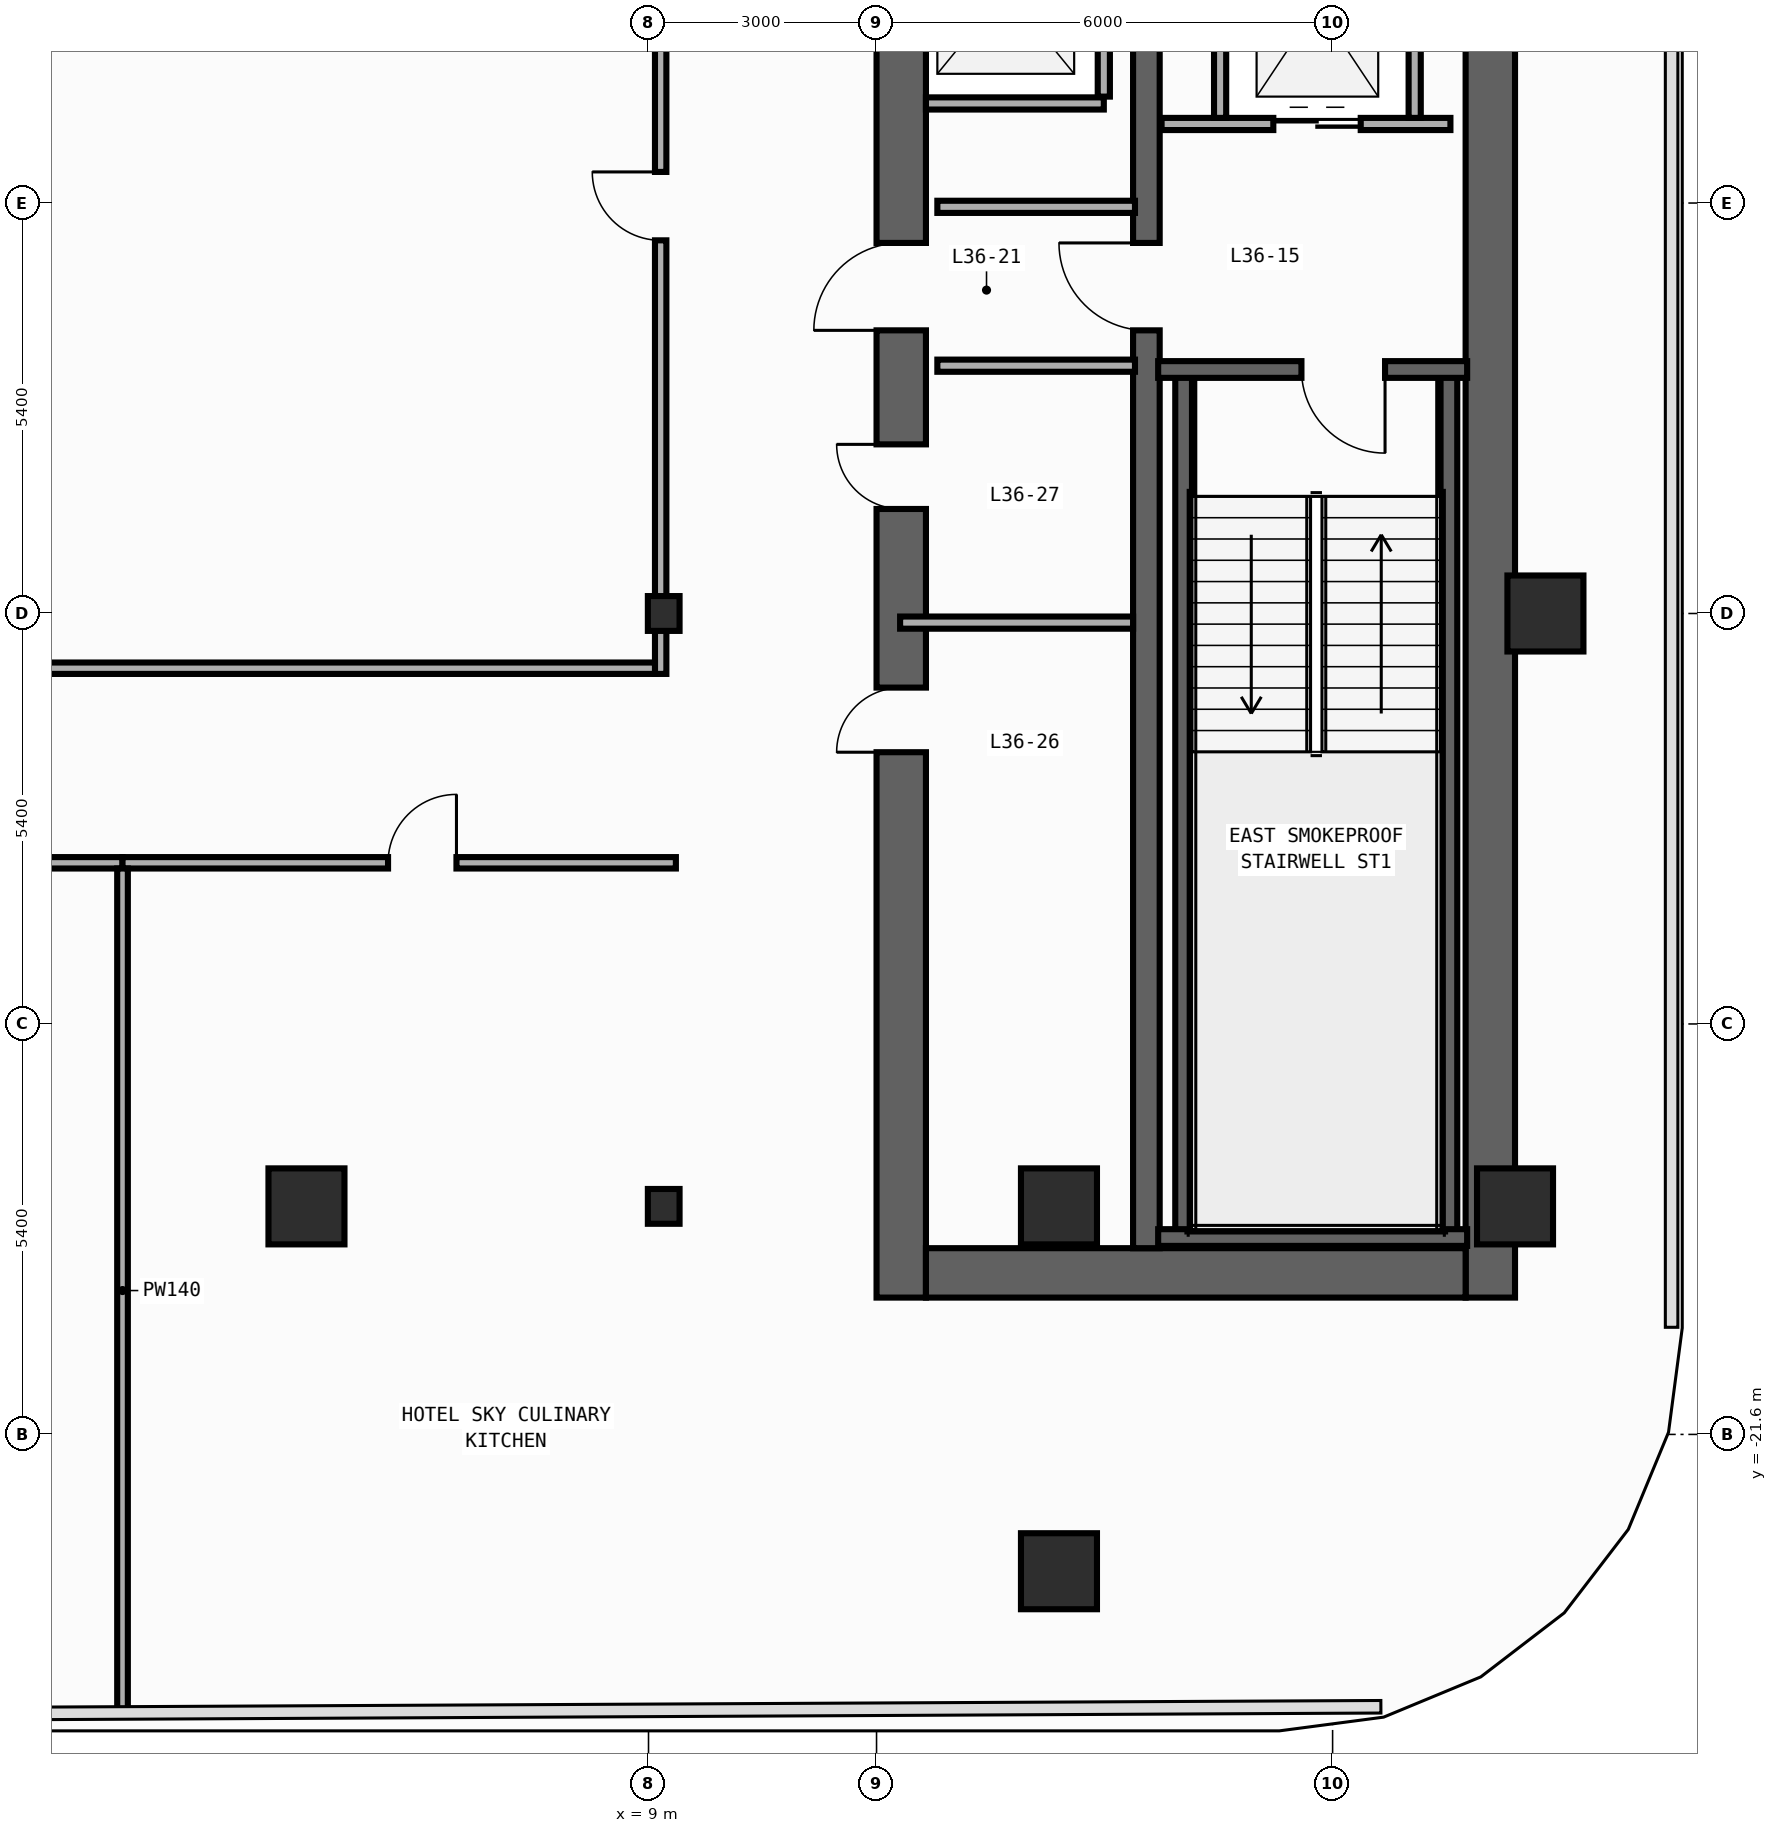
"""IFC4 building model, lengths in metres.
Left out: names, types, materials, properties, quantities, classifications, styles, units other than length and angle.
Written with IfcOpenShell. Run it as: python <this file> out.ifc"""

import sys

from ifc_helpers import new_model, si_unit, direction, frame, frame_2d, origin, origin_2d, place, context, subcontext, project, spatial, rectangle, i_section, extrude, element, fill, save


model = new_model("IFC4")
c1 = context("Model", 3, precision=1e-05, world=origin(), true_north=direction((0.0, 1.0)))
c2 = subcontext(c1, "Body", "Model", "MODEL_VIEW")
j1 = project(units=[si_unit("LENGTHUNIT", "METRE"), si_unit("PLANEANGLEUNIT", "RADIAN")], contexts=[c1])
p1 = place(None, origin())
s1 = spatial("IfcSite", under=j1, at=p1, CompositionType="ELEMENT")
p2 = place(p1, origin())
s2 = spatial("IfcBuilding", under=s1, at=p2, CompositionType="ELEMENT")
p3 = place(p2, frame((0.0, 0.0, 160.4)))
s3 = spatial("IfcBuildingStorey", under=s2, at=p3, CompositionType="ELEMENT", Elevation=160.4)
p4 = place(p3, frame((12.325, -19.8, 0.0), z_axis=(0.0, 0.0, 1.0), x_axis=(0.0, 1.0, 0.0)))
e1 = element("IfcWall", 1, at=p4, inside=s3, PredefinedType="SHEAR", context=c2, shape_type="SweptSolid", body=[
    extrude(rectangle(XDim=27.0, YDim=0.65, at=frame_2d((13.5, 0.0))), origin(), (0.0, 0.0, 1.0), 4.34),
])
p5 = place(p4, frame((23.05, 0.0, 0.0)))
e2 = element("IfcOpeningElement", 2, at=p5, cuts=e1, PredefinedType="OPENING", context=c2, shape_type="SweptSolid", body=[
    extrude(rectangle(XDim=1.1, YDim=2.2, at=frame_2d((0.55, 1.1))), frame((0.0, 0.335, 0.0), z_axis=(0.0, -1.0, 0.0), x_axis=(1.0, 0.0, 0.0)), (0.0, 0.0, 1.0), 0.67),
])
p6 = place(p4, frame((19.85, 0.0, 0.0)))
e3 = element("IfcOpeningElement", 3, at=p6, cuts=e1, PredefinedType="OPENING", context=c2, shape_type="SweptSolid", body=[
    extrude(rectangle(XDim=1.1, YDim=2.2, at=frame_2d((0.55, 1.1))), frame((0.0, 0.335, 0.0), z_axis=(0.0, -1.0, 0.0), x_axis=(1.0, 0.0, 0.0)), (0.0, 0.0, 1.0), 0.67),
])
p7 = place(p4, frame((16.65, 0.0, 0.0)))
e4 = element("IfcOpeningElement", 4, at=p7, cuts=e1, PredefinedType="OPENING", context=c2, shape_type="SweptSolid", body=[
    extrude(rectangle(XDim=1.1, YDim=2.2, at=frame_2d((0.55, 1.1))), frame((0.0, 0.335, 0.0), z_axis=(0.0, -1.0, 0.0), x_axis=(1.0, 0.0, 0.0)), (0.0, 0.0, 1.0), 0.67),
])
p8 = place(p4, frame((7.175, 0.0, 0.0)))
e5 = element("IfcOpeningElement", 5, at=p8, cuts=e1, PredefinedType="OPENING", context=c2, shape_type="SweptSolid", body=[
    extrude(rectangle(XDim=0.85, YDim=2.1, at=frame_2d((0.425, 1.05))), frame((0.0, 0.335, 0.0), z_axis=(0.0, -1.0, 0.0), x_axis=(1.0, 0.0, 0.0)), (0.0, 0.0, 1.0), 0.67),
])
p9 = place(p4, frame((10.375, 0.0, 0.0)))
e6 = element("IfcOpeningElement", 6, at=p9, cuts=e1, PredefinedType="OPENING", context=c2, shape_type="SweptSolid", body=[
    extrude(rectangle(XDim=0.85, YDim=2.1, at=frame_2d((0.425, 1.05))), frame((0.0, 0.335, 0.0), z_axis=(0.0, -1.0, 0.0), x_axis=(1.0, 0.0, 0.0)), (0.0, 0.0, 1.0), 0.67),
])
p10 = place(p4, frame((12.725, 0.0, 0.0)))
e7 = element("IfcOpeningElement", 7, at=p10, cuts=e1, PredefinedType="OPENING", context=c2, shape_type="SweptSolid", body=[
    extrude(rectangle(XDim=1.15, YDim=2.2, at=frame_2d((0.575, 1.1))), frame((0.0, 0.335, 0.0), z_axis=(0.0, -1.0, 0.0), x_axis=(1.0, 0.0, 0.0)), (0.0, 0.0, 1.0), 0.67),
])
p11 = place(p4, frame((25.125, 0.0, 0.0)))
e8 = element("IfcOpeningElement", 8, at=p11, cuts=e1, PredefinedType="OPENING", context=c2, shape_type="SweptSolid", body=[
    extrude(rectangle(XDim=0.85, YDim=2.1, at=frame_2d((0.425, 1.05))), frame((0.0, 0.335, 0.0), z_axis=(0.0, -1.0, 0.0), x_axis=(1.0, 0.0, 0.0)), (0.0, 0.0, 1.0), 0.67),
])
p12 = place(p3, frame((20.075, -19.8, 0.0), z_axis=(0.0, 0.0, 1.0), x_axis=(0.0, 1.0, 0.0)))
e9 = element("IfcWall", 9, at=p12, inside=s3, PredefinedType="SHEAR", context=c2, shape_type="SweptSolid", body=[
    extrude(rectangle(XDim=27.0, YDim=0.65, at=frame_2d((13.5, 0.0))), origin(), (0.0, 0.0, 1.0), 4.34),
])
p13 = place(p3, frame((12.65, -19.475, 0.0), z_axis=(0.0, 0.0, 1.0), x_axis=(1.0, 0.0, 0.0)))
e10 = element("IfcWall", 10, at=p13, inside=s3, PredefinedType="SHEAR", context=c2, shape_type="SweptSolid", body=[
    extrude(rectangle(XDim=7.1, YDim=0.65, at=frame_2d((3.55, 0.0))), origin(), (0.0, 0.0, 1.0), 4.34),
])
p14 = place(p3, frame((15.55, -19.15, 0.0), z_axis=(0.0, 0.0, 1.0), x_axis=(0.0, 1.0, 0.0)))
e11 = element("IfcWall", 11, at=p14, inside=s3, PredefinedType="SHEAR", context=c2, shape_type="SweptSolid", body=[
    extrude(rectangle(XDim=25.7, YDim=0.35, at=frame_2d((12.85, 0.0))), origin(), (0.0, 0.0, 1.0), 4.34),
])
p15 = place(p14, frame((12.075, 0.0, 0.0)))
e12 = element("IfcOpeningElement", 12, at=p15, cuts=e11, PredefinedType="OPENING", context=c2, shape_type="SweptSolid", body=[
    extrude(rectangle(XDim=1.15, YDim=2.2, at=frame_2d((0.575, 1.1))), frame((0.0, 0.185, 0.0), z_axis=(0.0, -1.0, 0.0), x_axis=(1.0, 0.0, 0.0)), (0.0, 0.0, 1.0), 0.37),
])
p16 = place(p14, frame((24.475, 0.0, 0.0)))
e13 = element("IfcOpeningElement", 13, at=p16, cuts=e11, PredefinedType="OPENING", context=c2, shape_type="SweptSolid", body=[
    extrude(rectangle(XDim=0.85, YDim=2.1, at=frame_2d((0.425, 1.05))), frame((0.0, 0.185, 0.0), z_axis=(0.0, -1.0, 0.0), x_axis=(1.0, 0.0, 0.0)), (0.0, 0.0, 1.0), 0.37),
])
for number, where, z_axis, x_axis in (
    (14, (16.04, -19.01, 0.0), (0.0, 0.0, 1.0), (0.0, 1.0, 0.0)),
    (15, (19.53, -19.01, 0.0), (0.0, 0.0, 1.0), (0.0, 1.0, 0.0)),
):
    element("IfcWall", number, at=place(p3, frame(where, z_axis=z_axis, x_axis=x_axis)), inside=s3, PredefinedType="SHEAR", context=c2, shape_type="SweptSolid", body=[
        extrude(rectangle(XDim=11.42, YDim=0.22, at=frame_2d((5.71, 0.0))), origin(), (0.0, 0.0, 1.0), 4.34),
    ])
p17 = place(p3, frame((15.705, -19.01, 0.0), z_axis=(0.0, 0.0, 1.0), x_axis=(1.0, 0.0, 0.0)))
e16 = element("IfcWall", 16, at=p17, inside=s3, PredefinedType="SHEAR", context=c2, shape_type="SweptSolid", body=[
    extrude(rectangle(XDim=4.065, YDim=0.22, at=frame_2d((2.032, 0.0))), origin(), (0.0, 0.0, 1.0), 4.34),
])
p18 = place(p3, frame((19.77, -7.59, 0.0), z_axis=(0.0, 0.0, 1.0), x_axis=(-1.0, 0.0, 0.0)))
e17 = element("IfcWall", 17, at=p18, inside=s3, PredefinedType="SHEAR", context=c2, shape_type="SweptSolid", body=[
    extrude(rectangle(XDim=4.065, YDim=0.22, at=frame_2d((2.032, 0.0))), origin(), (0.0, 0.0, 1.0), 4.34),
])
p19 = place(p18, frame((1.08, 0.0, 0.0)))
e18 = element("IfcOpeningElement", 18, at=p19, cuts=e17, PredefinedType="OPENING", context=c2, shape_type="SweptSolid", body=[
    extrude(rectangle(XDim=1.1, YDim=2.2, at=frame_2d((0.55, 1.1))), frame((0.0, 0.12, 0.0), z_axis=(0.0, -1.0, 0.0), x_axis=(1.0, 0.0, 0.0)), (0.0, 0.0, 1.0), 0.24),
])
for number, where, z_axis, x_axis in (
    (19, (9.2, -18.6, 0.0), (0.0, 0.0, 1.0), (1.0, 0.0, 0.0)),
    (20, (9.2, -10.8, 0.0), (0.0, 0.0, 1.0), (1.0, 0.0, 0.0)),
):
    element("IfcColumn", number, at=place(p3, frame(where, z_axis=z_axis, x_axis=x_axis)), inside=s3, PredefinedType="COLUMN", context=c2, shape_type="SweptSolid", body=[
        extrude(i_section(OverallWidth=0.417, OverallDepth=0.458, WebThickness=0.03, FlangeThickness=0.05, FilletRadius=0.022, at=origin_2d()), origin(), (0.0, 0.0, 1.0), 4.6),
    ])
for number, where, z_axis, x_axis in (
    (21, (20.4, -18.6, 0.0), (0.0, 0.0, 1.0), (1.0, 0.0, 0.0)),
    (22, (14.4, -18.6, 0.0), (0.0, 0.0, 1.0), (1.0, 0.0, 0.0)),
    (23, (4.5, -18.6, 0.0), (0.0, 0.0, 1.0), (1.0, 0.0, 0.0)),
    (24, (20.8, -10.8, 0.0), (0.0, 0.0, 1.0), (1.0, 0.0, 0.0)),
    (25, (14.4, -23.4, 0.0), (0.0, 0.0, 1.0), (1.0, 0.0, 0.0)),
):
    element("IfcColumn", number, at=place(p3, frame(where, z_axis=z_axis, x_axis=x_axis)), inside=s3, PredefinedType="COLUMN", context=c2, shape_type="SweptSolid", body=[
        extrude(rectangle(XDim=1.0, YDim=1.0, at=origin_2d()), origin(), (0.0, 0.0, 1.0), 4.6),
    ])
p20 = place(p3, frame((12.65, -4.09, 0.0), z_axis=(0.0, 0.0, 1.0), x_axis=(1.0, 0.0, 0.0)))
e26 = element("IfcWall", 26, at=p20, inside=s3, PredefinedType="STANDARD", context=c2, shape_type="SweptSolid", body=[
    extrude(rectangle(XDim=2.34, YDim=0.16, at=frame_2d((1.17, 0.0))), origin(), (0.0, 0.0, 1.0), 4.34),
])
p21 = place(p3, frame((14.99, -4.0, 0.0), z_axis=(0.0, 0.0, 1.0), x_axis=(0.0, 1.0, 0.0)))
e27 = element("IfcWall", 27, at=p21, inside=s3, PredefinedType="STANDARD", context=c2, shape_type="SweptSolid", body=[
    extrude(rectangle(XDim=2.8, YDim=0.16, at=frame_2d((1.4, 0.0))), origin(), (0.0, 0.0, 1.0), 4.34),
])
p22 = place(p3, frame((15.75, -4.36, 0.0), z_axis=(0.0, 0.0, 1.0), x_axis=(1.0, 0.0, 0.0)))
e28 = element("IfcWall", 28, at=p22, inside=s3, PredefinedType="STANDARD", context=c2, shape_type="SweptSolid", body=[
    extrude(rectangle(XDim=3.8, YDim=0.16, at=frame_2d((1.9, 0.0))), origin(), (0.0, 0.0, 1.0), 4.34),
])
p23 = place(p22, frame((1.47, 0.0, 0.0)))
e29 = element("IfcOpeningElement", 29, at=p23, cuts=e28, PredefinedType="OPENING", context=c2, shape_type="SweptSolid", body=[
    extrude(rectangle(XDim=1.15, YDim=2.2, at=frame_2d((0.575, 1.1))), frame((0.0, 0.09, 0.0), z_axis=(0.0, -1.0, 0.0), x_axis=(1.0, 0.0, 0.0)), (0.0, 0.0, 1.0), 0.18),
])
for number, where, z_axis, x_axis in (
    (30, (16.52, -4.28, 0.0), (0.0, 0.0, 1.0), (0.0, 1.0, 0.0)),
    (31, (19.08, -4.28, 0.0), (0.0, 0.0, 1.0), (0.0, 1.0, 0.0)),
):
    element("IfcWall", number, at=place(p3, frame(where, z_axis=z_axis, x_axis=x_axis)), inside=s3, PredefinedType="STANDARD", context=c2, shape_type="SweptSolid", body=[
        extrude(rectangle(XDim=2.98, YDim=0.16, at=frame_2d((1.49, 0.0))), origin(), (0.0, 0.0, 1.0), 4.34),
    ])
for number, where, z_axis, x_axis in (
    (32, (12.8, -5.45, 0.0), (0.0, 0.0, 1.0), (1.0, 0.0, 0.0)),
    (33, (12.8, -7.54, 0.0), (0.0, 0.0, 1.0), (1.0, 0.0, 0.0)),
):
    element("IfcWall", number, at=place(p3, frame(where, z_axis=z_axis, x_axis=x_axis)), inside=s3, PredefinedType="STANDARD", context=c2, shape_type="SweptSolid", body=[
        extrude(rectangle(XDim=2.6, YDim=0.16, at=frame_2d((1.3, 0.0))), origin(), (0.0, 0.0, 1.0), 4.34),
    ])
p24 = place(p3, frame((12.31, -10.92, 0.0), z_axis=(0.0, 0.0, 1.0), x_axis=(1.0, 0.0, 0.0)))
e34 = element("IfcWall", 34, at=p24, inside=s3, PredefinedType="PARTITIONING", context=c2, shape_type="SweptSolid", body=[
    extrude(rectangle(XDim=3.065, YDim=0.16, at=frame_2d((1.532, 0.0))), origin(), (0.0, 0.0, 1.0), 3.752),
])
p25 = place(p3, frame((9.16, -11.595, 0.0), z_axis=(0.0, 0.0, 1.0), x_axis=(0.0, 1.0, 0.0)))
e35 = element("IfcWall", 35, at=p25, inside=s3, PredefinedType="PARTITIONING", context=c2, shape_type="SweptSolid", body=[
    extrude(rectangle(XDim=22.17, YDim=0.15, at=frame_2d((11.085, 0.0))), origin(), (0.0, 0.0, 1.0), 3.752),
])
p26 = place(p25, frame((5.704, 0.0, 0.0)))
e36 = element("IfcOpeningElement", 36, at=p26, cuts=e35, PredefinedType="OPENING", context=c2, shape_type="SweptSolid", body=[
    extrude(rectangle(XDim=0.9, YDim=2.15, at=frame_2d((0.45, 1.075))), frame((0.0, 0.085, 0.0), z_axis=(0.0, -1.0, 0.0), x_axis=(1.0, 0.0, 0.0)), (0.0, 0.0, 1.0), 0.17),
])
p27 = place(p3, frame((-9.085, -11.52, 0.0), z_axis=(0.0, 0.0, 1.0), x_axis=(1.0, 0.0, 0.0)))
e37 = element("IfcWall", 37, at=p27, inside=s3, PredefinedType="PARTITIONING", context=c2, shape_type="SweptSolid", body=[
    extrude(rectangle(XDim=18.17, YDim=0.15, at=frame_2d((9.085, 0.0))), origin(), (0.0, 0.0, 1.0), 4.34),
])
p28 = place(p27, frame((6.516, 0.0, 0.0)))
e38 = element("IfcOpeningElement", 38, at=p28, cuts=e37, PredefinedType="OPENING", context=c2, shape_type="SweptSolid", body=[
    extrude(rectangle(XDim=0.9, YDim=2.15, at=frame_2d((0.45, 1.075))), frame((0.0, 0.085, 0.0), z_axis=(0.0, -1.0, 0.0), x_axis=(1.0, 0.0, 0.0)), (0.0, 0.0, 1.0), 0.17),
])
p29 = place(p3, frame((-10.19, -14.08, 0.0), z_axis=(0.0, 0.0, 1.0), x_axis=(1.0, 0.0, 0.0)))
e39 = element("IfcWall", 39, at=p29, inside=s3, PredefinedType="PARTITIONING", context=c2, shape_type="SweptSolid", body=[
    extrude(rectangle(XDim=12.27, YDim=0.15, at=frame_2d((6.135, 0.0))), origin(), (0.0, 0.0, 1.0), 4.34),
])
p30 = place(p29, frame((7.494, 0.0, 0.0)))
e40 = element("IfcOpeningElement", 40, at=p30, cuts=e39, PredefinedType="OPENING", context=c2, shape_type="SweptSolid", body=[
    extrude(rectangle(XDim=0.9, YDim=2.15, at=frame_2d((0.45, 1.075))), frame((0.0, 0.085, 0.0), z_axis=(0.0, -1.0, 0.0), x_axis=(1.0, 0.0, 0.0)), (0.0, 0.0, 1.0), 0.17),
])
p31 = place(p3, frame((2.08, -14.08, 0.0), z_axis=(0.0, 0.0, 1.0), x_axis=(1.0, 0.0, 0.0)))
e41 = element("IfcWall", 41, at=p31, inside=s3, PredefinedType="PARTITIONING", context=c2, shape_type="SweptSolid", body=[
    extrude(rectangle(XDim=7.28, YDim=0.15, at=frame_2d((3.64, 0.0))), origin(), (0.0, 0.0, 1.0), 4.34),
])
p32 = place(p31, frame((3.493, 0.0, 0.0)))
e42 = element("IfcOpeningElement", 42, at=p32, cuts=e41, PredefinedType="OPENING", context=c2, shape_type="SweptSolid", body=[
    extrude(rectangle(XDim=0.9, YDim=2.15, at=frame_2d((0.45, 1.075))), frame((0.0, 0.085, 0.0), z_axis=(0.0, -1.0, 0.0), x_axis=(1.0, 0.0, 0.0)), (0.0, 0.0, 1.0), 0.17),
])
p33 = place(p3, frame((2.08, -25.26, 0.0), z_axis=(0.0, 0.0, 1.0), x_axis=(0.0, 1.0, 0.0)))
e43 = element("IfcWall", 43, at=p33, inside=s3, PredefinedType="PARTITIONING", context=c2, shape_type="SweptSolid", body=[
    extrude(rectangle(XDim=11.104, YDim=0.14, at=frame_2d((5.552, 0.0))), origin(), (0.0, 0.0, 1.0), 4.34),
])
p34 = place(p19, origin())
e44 = element("IfcDoor", 44, at=p34, inside=s3, OperationType="SINGLE_SWING_LEFT", PredefinedType="DOOR", context=c2, shape_type="SweptSolid", body=[
    extrude(rectangle(XDim=1.1, YDim=2.2, at=frame_2d((0.55, 1.1))), frame((0.0, 0.025, 0.0), z_axis=(0.0, -1.0, 0.0), x_axis=(1.0, 0.0, 0.0)), (0.0, 0.0, 1.0), 0.05),
])
fill(e18, e44)
p35 = place(p8, origin())
e45 = element("IfcDoor", 45, at=p35, inside=s3, OperationType="SINGLE_SWING_LEFT", PredefinedType="DOOR", context=c2, shape_type="SweptSolid", body=[
    extrude(rectangle(XDim=0.85, YDim=2.1, at=frame_2d((0.425, 1.05))), frame((0.0, 0.025, 0.0), z_axis=(0.0, -1.0, 0.0), x_axis=(1.0, 0.0, 0.0)), (0.0, 0.0, 1.0), 0.05),
])
fill(e5, e45)
p36 = place(p9, origin())
e46 = element("IfcDoor", 46, at=p36, inside=s3, OperationType="SINGLE_SWING_RIGHT", PredefinedType="DOOR", context=c2, shape_type="SweptSolid", body=[
    extrude(rectangle(XDim=0.85, YDim=2.1, at=frame_2d((0.425, 1.05))), frame((0.0, 0.025, 0.0), z_axis=(0.0, -1.0, 0.0), x_axis=(1.0, 0.0, 0.0)), (0.0, 0.0, 1.0), 0.05),
])
fill(e6, e46)
p37 = place(p10, origin())
e47 = element("IfcDoor", 47, at=p37, inside=s3, OperationType="SINGLE_SWING_LEFT", PredefinedType="DOOR", context=c2, shape_type="SweptSolid", body=[
    extrude(rectangle(XDim=1.15, YDim=2.2, at=frame_2d((0.575, 1.1))), frame((0.0, 0.025, 0.0), z_axis=(0.0, -1.0, 0.0), x_axis=(1.0, 0.0, 0.0)), (0.0, 0.0, 1.0), 0.05),
])
fill(e7, e47)
p38 = place(p15, origin())
e48 = element("IfcDoor", 48, at=p38, inside=s3, OperationType="SINGLE_SWING_RIGHT", PredefinedType="DOOR", context=c2, shape_type="SweptSolid", body=[
    extrude(rectangle(XDim=1.15, YDim=2.2, at=frame_2d((0.575, 1.1))), frame((0.0, 0.025, 0.0), z_axis=(0.0, -1.0, 0.0), x_axis=(1.0, 0.0, 0.0)), (0.0, 0.0, 1.0), 0.05),
])
fill(e12, e48)
p39 = place(p23, origin())
e49 = element("IfcDoor", 49, at=p39, inside=s3, OperationType="DOUBLE_DOOR_SLIDING", PredefinedType="DOOR", context=c2, shape_type="SweptSolid", body=[
    extrude(rectangle(XDim=1.15, YDim=2.2, at=frame_2d((0.575, 1.1))), frame((0.0, 0.025, 0.0), z_axis=(0.0, -1.0, 0.0), x_axis=(1.0, 0.0, 0.0)), (0.0, 0.0, 1.0), 0.05),
])
fill(e29, e49)
p40 = place(p26, origin())
e50 = element("IfcDoor", 50, at=p40, inside=s3, OperationType="SINGLE_SWING_RIGHT", PredefinedType="DOOR", context=c2, shape_type="SweptSolid", body=[
    extrude(rectangle(XDim=0.9, YDim=2.15, at=frame_2d((0.45, 1.075))), frame((0.0, 0.025, 0.0), z_axis=(0.0, -1.0, 0.0), x_axis=(1.0, 0.0, 0.0)), (0.0, 0.0, 1.0), 0.05),
])
fill(e36, e50)
p41 = place(p32, origin())
e51 = element("IfcDoor", 51, at=p41, inside=s3, OperationType="SINGLE_SWING_RIGHT", PredefinedType="DOOR", context=c2, shape_type="SweptSolid", body=[
    extrude(rectangle(XDim=0.9, YDim=2.15, at=frame_2d((0.45, 1.075))), frame((0.0, 0.025, 0.0), z_axis=(0.0, -1.0, 0.0), x_axis=(1.0, 0.0, 0.0)), (0.0, 0.0, 1.0), 0.05),
])
fill(e42, e51)
save(model, sys.argv[1])
